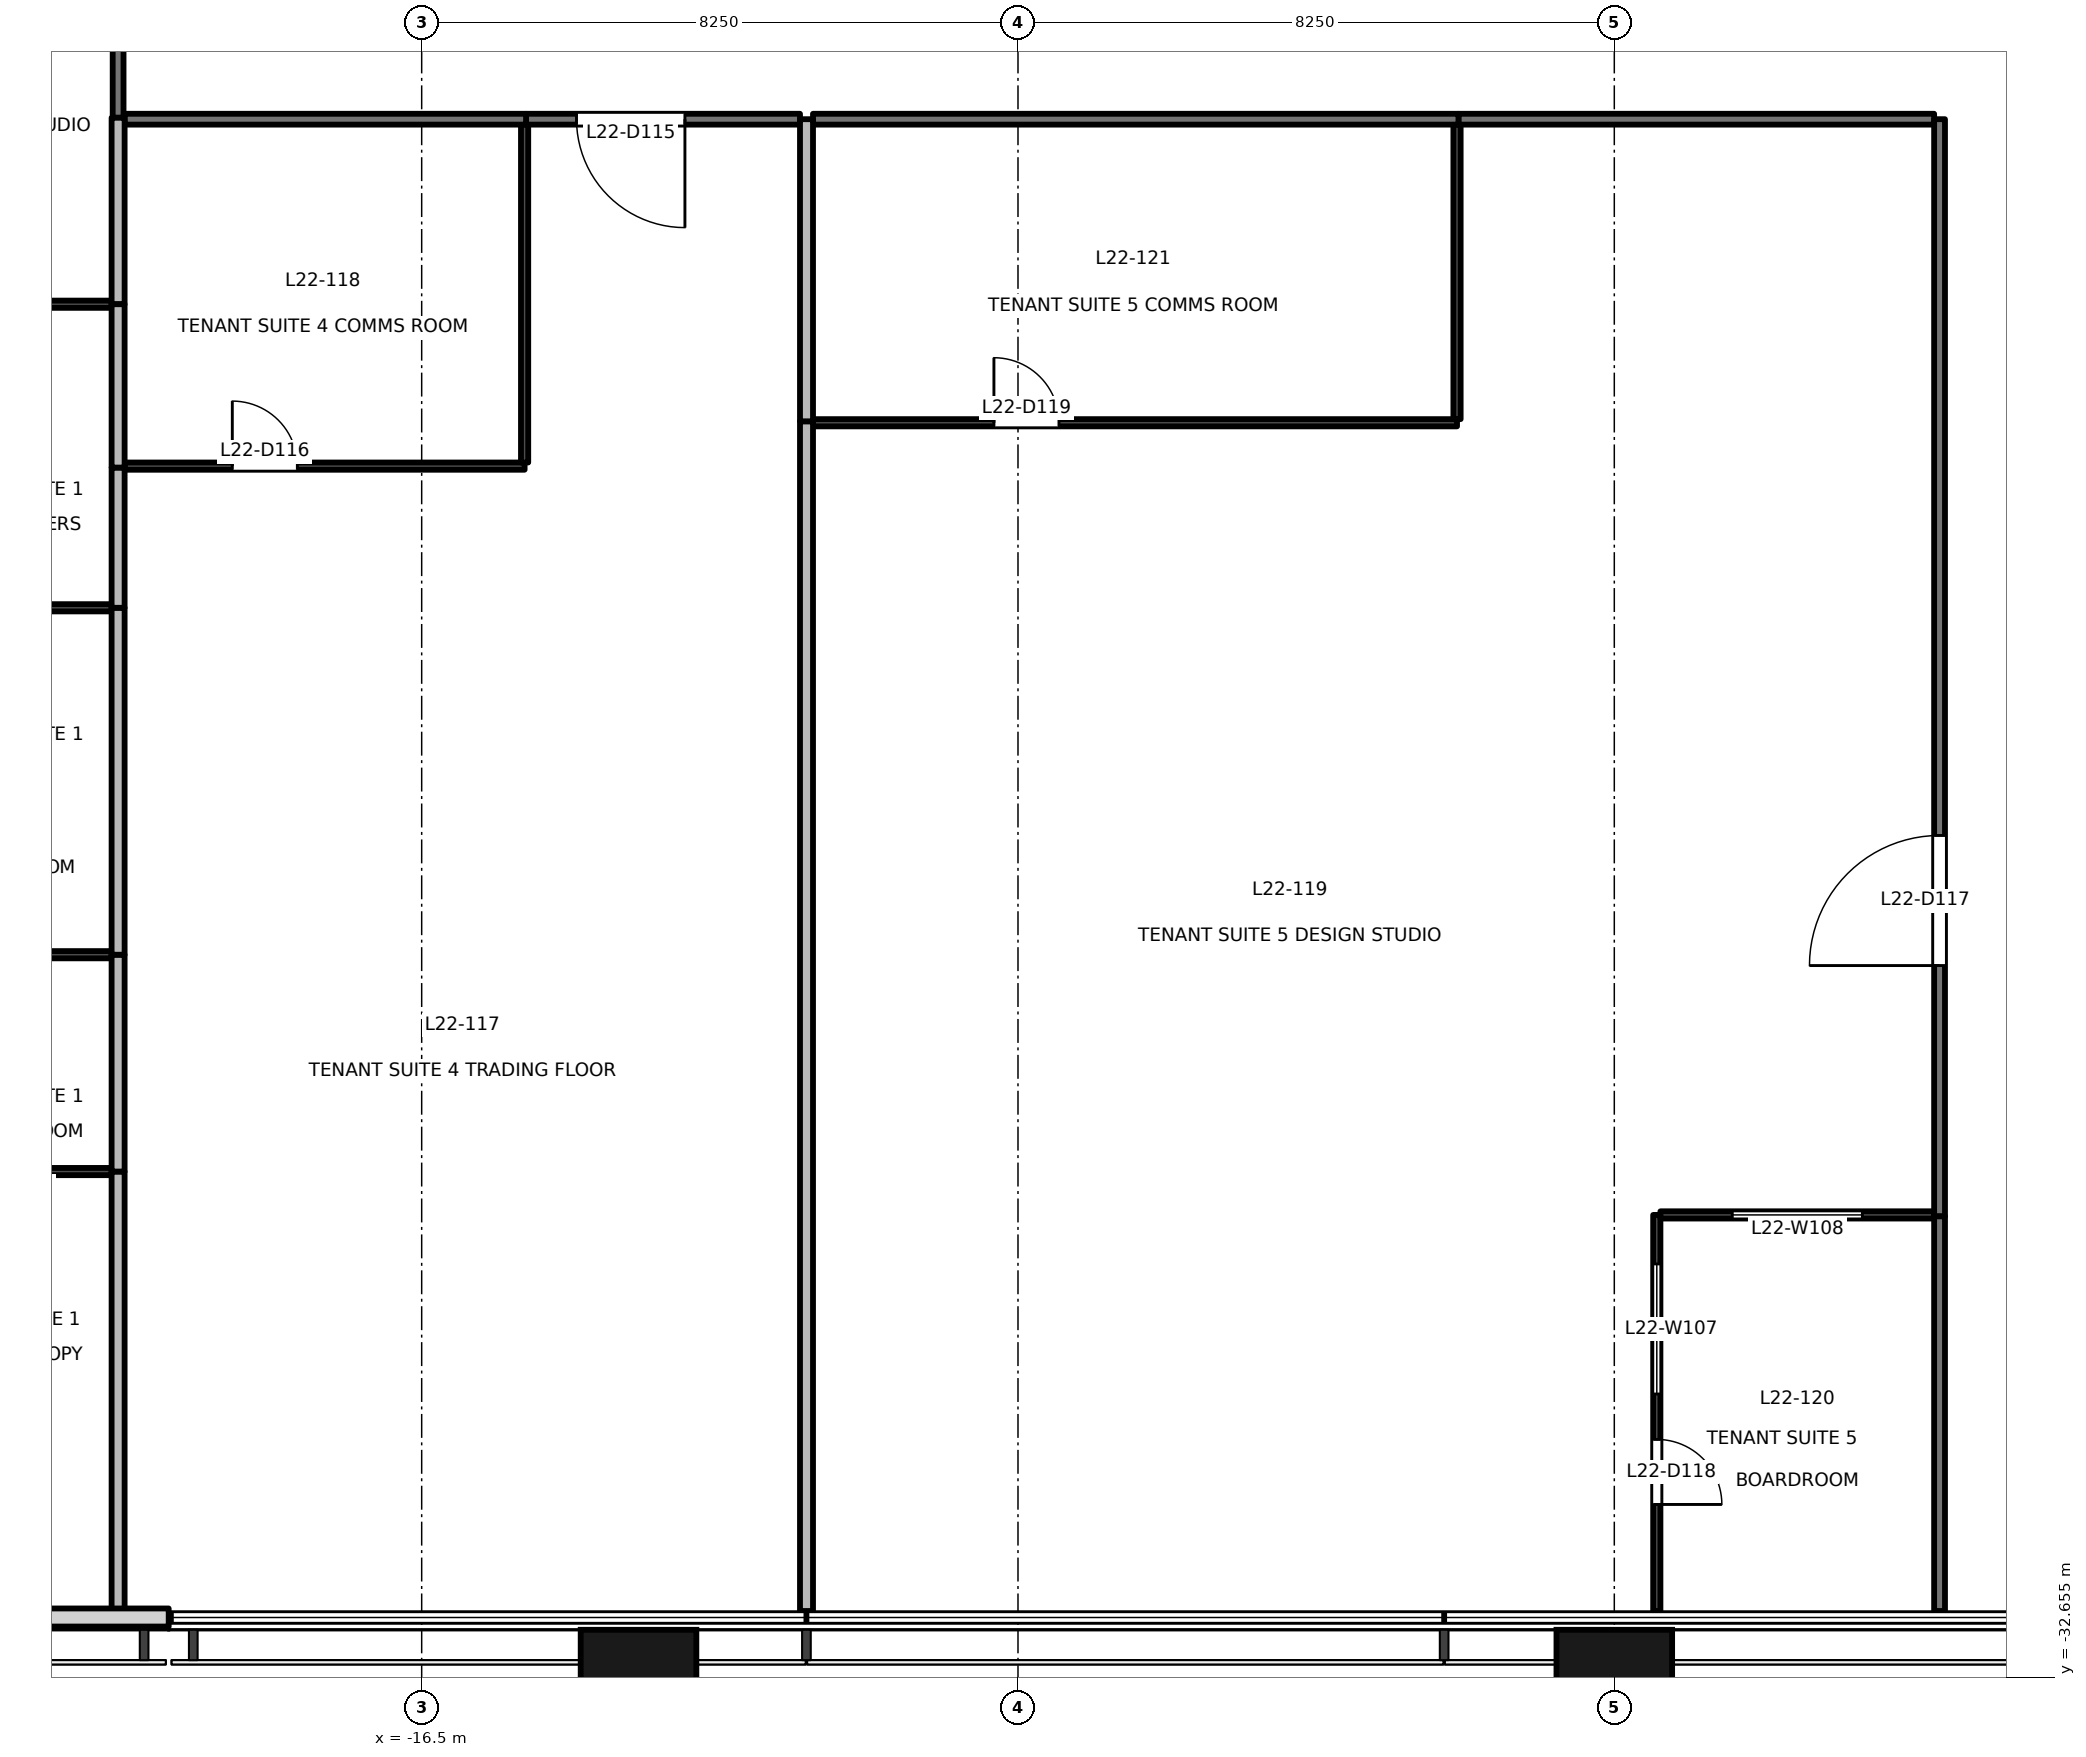
"""IFC4 building model, lengths in metres.
Left out: names, types, materials, properties, quantities, classifications, styles, units other than length and angle.
Written with IfcOpenShell. Run it as: python <this file> out.ifc"""

import sys

from ifc_helpers import new_model, si_unit, direction, frame, frame_2d, origin, origin_2d, place, context, subcontext, project, spatial, rectangle, extrude, element, fill, save


model = new_model("IFC4")
c1 = context("Model", 3, precision=1e-05, world=origin(), true_north=direction((0.0, 1.0)))
c2 = subcontext(c1, "Body", "Model", "MODEL_VIEW")
j1 = project(units=[si_unit("LENGTHUNIT", "METRE"), si_unit("PLANEANGLEUNIT", "RADIAN")], contexts=[c1])
p1 = place(None, origin())
s1 = spatial("IfcSite", under=j1, at=p1, CompositionType="ELEMENT")
p2 = place(p1, origin())
s2 = spatial("IfcBuilding", under=s1, at=p2, CompositionType="ELEMENT")
p3 = place(p2, frame((0.0, 0.0, 99.7)))
s3 = spatial("IfcBuildingStorey", under=s2, at=p3, CompositionType="ELEMENT", Elevation=99.7)
for number, where, z_axis, x_axis in (
    (1, (-13.5, -32.9, -0.2), (0.0, 0.0, 1.0), (1.0, 0.0, 0.0)),
    (2, (0.0, -32.9, -0.2), (0.0, 0.0, 1.0), (1.0, 0.0, 0.0)),
):
    element("IfcColumn", number, at=place(p3, frame(where, z_axis=z_axis, x_axis=x_axis)), inside=s3, PredefinedType="COLUMN", context=c2, shape_type="SweptSolid", body=[
        extrude(rectangle(XDim=1.6, YDim=1.8, at=origin_2d()), origin(), (0.0, 0.0, 1.0), 4.0),
    ])
p4 = place(p3, frame((-22.955, -31.83, 0.0), z_axis=(0.0, 0.0, 1.0), x_axis=(1.0, 0.0, 0.0)))
e3 = element("IfcWall", 3, at=p4, inside=s3, PredefinedType="SOLIDWALL", context=c2, shape_type="SweptSolid", body=[
    extrude(rectangle(XDim=2.955, YDim=0.25, at=frame_2d((1.478, 0.0))), origin(), (0.0, 0.0, 1.0), 3.8),
])
p5 = place(p3, frame((-20.7, -11.08, 0.0), z_axis=(0.0, 0.0, 1.0), x_axis=(0.0, 1.0, 0.0)))
e4 = element("IfcWall", 4, at=p5, inside=s3, PredefinedType="PARTITIONING", context=c2, shape_type="SweptSolid", body=[
    extrude(rectangle(XDim=3.4, YDim=0.15, at=frame_2d((1.7, 0.0))), origin(), (0.0, 0.0, 1.0), 3.8),
])
p6 = place(p3, frame((-11.266, -11.1, 0.0), z_axis=(0.0, 0.0, 1.0), x_axis=(-1.0, 0.0, 0.0)))
e5 = element("IfcWall", 5, at=p6, inside=s3, PredefinedType="PARTITIONING", context=c2, shape_type="SweptSolid", body=[
    extrude(rectangle(XDim=3.79, YDim=0.15, at=frame_2d((1.895, 0.0))), origin(), (0.0, 0.0, 1.0), 2.8),
])
p7 = place(p6, frame((1.592, 0.0, 0.0)))
e6 = element("IfcOpeningElement", 6, at=p7, cuts=e5, PredefinedType="OPENING", context=c2, shape_type="SweptSolid", body=[
    extrude(rectangle(XDim=1.5, YDim=2.1, at=frame_2d((0.75, 1.05))), frame((0.0, 0.085, 0.0), z_axis=(0.0, -1.0, 0.0), x_axis=(1.0, 0.0, 0.0)), (0.0, 0.0, 1.0), 0.171),
])
p8 = place(p3, frame((-15.056, -11.1, 0.0), z_axis=(0.0, 0.0, 1.0), x_axis=(-1.0, 0.0, 0.0)))
e7 = element("IfcWall", 7, at=p8, inside=s3, PredefinedType="PARTITIONING", context=c2, shape_type="SweptSolid", body=[
    extrude(rectangle(XDim=5.554, YDim=0.15, at=frame_2d((2.777, 0.0))), origin(), (0.0, 0.0, 1.0), 3.8),
])
p9 = place(p3, frame((4.425, -11.1, 0.0), z_axis=(0.0, 0.0, 1.0), x_axis=(-1.0, 0.0, 0.0)))
e8 = element("IfcWall", 8, at=p9, inside=s3, PredefinedType="PARTITIONING", context=c2, shape_type="SweptSolid", body=[
    extrude(rectangle(XDim=6.581, YDim=0.15, at=frame_2d((3.291, 0.0))), origin(), (0.0, 0.0, 1.0), 2.8),
])
p10 = place(p3, frame((4.5, -26.28, 0.0), z_axis=(0.0, 0.0, 1.0), x_axis=(0.0, 1.0, 0.0)))
e9 = element("IfcWall", 9, at=p10, inside=s3, PredefinedType="PARTITIONING", context=c2, shape_type="SweptSolid", body=[
    extrude(rectangle(XDim=15.18, YDim=0.15, at=frame_2d((7.59, 0.0))), origin(), (0.0, 0.0, 1.0), 2.8),
])
p11 = place(p10, frame((3.47, 0.0, 0.0)))
e10 = element("IfcOpeningElement", 10, at=p11, cuts=e9, PredefinedType="OPENING", context=c2, shape_type="SweptSolid", body=[
    extrude(rectangle(XDim=1.8, YDim=2.1, at=frame_2d((0.9, 1.05))), frame((0.0, 0.085, 0.0), z_axis=(0.0, -1.0, 0.0), x_axis=(1.0, 0.0, 0.0)), (0.0, 0.0, 1.0), 0.171),
])
p12 = place(p3, frame((4.5, -31.74, 0.0), z_axis=(0.0, 0.0, 1.0), x_axis=(0.0, 1.0, 0.0)))
e11 = element("IfcWall", 11, at=p12, inside=s3, PredefinedType="PARTITIONING", context=c2, shape_type="SweptSolid", body=[
    extrude(rectangle(XDim=5.46, YDim=0.15, at=frame_2d((2.73, 0.0))), origin(), (0.0, 0.0, 1.0), 2.8),
])
p13 = place(p3, frame((-2.156, -11.1, 0.0), z_axis=(0.0, 0.0, 1.0), x_axis=(-1.0, 0.0, 0.0)))
e12 = element("IfcWall", 12, at=p13, inside=s3, PredefinedType="PARTITIONING", context=c2, shape_type="SweptSolid", body=[
    extrude(rectangle(XDim=8.93, YDim=0.15, at=frame_2d((4.465, 0.0))), origin(), (0.0, 0.0, 1.0), 2.8),
])
p14 = place(p3, frame((-20.79, -13.66, 0.0), z_axis=(0.0, 0.0, 1.0), x_axis=(-1.0, 0.0, 0.0)))
e13 = element("IfcWall", 13, at=p14, inside=s3, PredefinedType="PARTITIONING", context=c2, shape_type="SweptSolid", body=[
    extrude(rectangle(XDim=2.86, YDim=0.1, at=frame_2d((1.43, 0.0))), origin(), (0.0, 0.0, 1.0), 3.8),
])
p15 = place(p3, frame((-20.7, -11.08, 0.0), z_axis=(0.0, 0.0, 1.0), x_axis=(0.0, -1.0, 0.0)))
e14 = element("IfcWall", 14, at=p15, inside=s3, PredefinedType="PARTITIONING", context=c2, shape_type="SweptSolid", body=[
    extrude(rectangle(XDim=2.58, YDim=0.18, at=frame_2d((1.29, 0.0))), origin(), (0.0, 0.0, 1.0), 3.8),
])
p16 = place(p3, frame((-20.79, -25.66, 0.0), z_axis=(0.0, 0.0, 1.0), x_axis=(-1.0, 0.0, 0.0)))
e15 = element("IfcWall", 15, at=p16, inside=s3, PredefinedType="PARTITIONING", context=c2, shape_type="SweptSolid", body=[
    extrude(rectangle(XDim=2.86, YDim=0.1, at=frame_2d((1.43, 0.0))), origin(), (0.0, 0.0, 1.0), 3.8),
])
p17 = place(p16, frame((1.03, 0.0, 0.0)))
e16 = element("IfcOpeningElement", 16, at=p17, cuts=e15, PredefinedType="OPENING", context=c2, shape_type="SweptSolid", body=[
    extrude(rectangle(XDim=0.8, YDim=2.1, at=frame_2d((0.4, 1.05))), frame((0.0, 0.061, 0.0), z_axis=(0.0, -1.0, 0.0), x_axis=(1.0, 0.0, 0.0)), (0.0, 0.0, 1.0), 0.121),
])
p18 = place(p3, frame((-20.7, -25.66, 0.0), z_axis=(0.0, 0.0, 1.0), x_axis=(0.0, -1.0, 0.0)))
e17 = element("IfcWall", 17, at=p18, inside=s3, PredefinedType="PARTITIONING", context=c2, shape_type="SweptSolid", body=[
    extrude(rectangle(XDim=6.08, YDim=0.18, at=frame_2d((3.04, 0.0))), origin(), (0.0, 0.0, 1.0), 3.8),
])
p19 = place(p3, frame((-23.65, -22.66, 0.0), z_axis=(0.0, 0.0, 1.0), x_axis=(1.0, 0.0, 0.0)))
e18 = element("IfcWall", 18, at=p19, inside=s3, PredefinedType="PARTITIONING", context=c2, shape_type="SweptSolid", body=[
    extrude(rectangle(XDim=2.86, YDim=0.1, at=frame_2d((1.43, 0.0))), origin(), (0.0, 0.0, 1.0), 3.8),
])
p20 = place(p3, frame((-20.7, -22.66, 0.0), z_axis=(0.0, 0.0, 1.0), x_axis=(0.0, -1.0, 0.0)))
e19 = element("IfcWall", 19, at=p20, inside=s3, PredefinedType="PARTITIONING", context=c2, shape_type="SweptSolid", body=[
    extrude(rectangle(XDim=3.0, YDim=0.18, at=frame_2d((1.5, 0.0))), origin(), (0.0, 0.0, 1.0), 3.8),
])
p21 = place(p3, frame((-23.65, -17.86, 0.0), z_axis=(0.0, 0.0, 1.0), x_axis=(1.0, 0.0, 0.0)))
e20 = element("IfcWall", 20, at=p21, inside=s3, PredefinedType="PARTITIONING", context=c2, shape_type="SweptSolid", body=[
    extrude(rectangle(XDim=2.86, YDim=0.1, at=frame_2d((1.43, 0.0))), origin(), (0.0, 0.0, 1.0), 3.8),
])
p22 = place(p3, frame((-20.7, -17.86, 0.0), z_axis=(0.0, 0.0, 1.0), x_axis=(0.0, -1.0, 0.0)))
e21 = element("IfcWall", 21, at=p22, inside=s3, PredefinedType="PARTITIONING", context=c2, shape_type="SweptSolid", body=[
    extrude(rectangle(XDim=4.8, YDim=0.18, at=frame_2d((2.4, 0.0))), origin(), (0.0, 0.0, 1.0), 3.8),
])
p23 = place(p3, frame((-20.7, -15.92, 0.0), z_axis=(0.0, 0.0, 1.0), x_axis=(0.0, -1.0, 0.0)))
e22 = element("IfcWall", 22, at=p23, inside=s3, PredefinedType="PARTITIONING", context=c2, shape_type="SweptSolid", body=[
    extrude(rectangle(XDim=1.94, YDim=0.18, at=frame_2d((0.97, 0.0))), origin(), (0.0, 0.0, 1.0), 3.8),
])
p24 = place(p3, frame((-20.7, -13.66, 0.0), z_axis=(0.0, 0.0, 1.0), x_axis=(0.0, -1.0, 0.0)))
e23 = element("IfcWall", 23, at=p24, inside=s3, PredefinedType="PARTITIONING", context=c2, shape_type="SweptSolid", body=[
    extrude(rectangle(XDim=2.26, YDim=0.18, at=frame_2d((1.13, 0.0))), origin(), (0.0, 0.0, 1.0), 3.8),
])
p25 = place(p3, frame((-20.61, -15.9, 0.0), z_axis=(0.0, 0.0, 1.0), x_axis=(1.0, 0.0, 0.0)))
e24 = element("IfcWall", 24, at=p25, inside=s3, PredefinedType="PARTITIONING", context=c2, shape_type="SweptSolid", body=[
    extrude(rectangle(XDim=5.534, YDim=0.1, at=frame_2d((2.767, 0.0))), origin(), (0.0, 0.0, 1.0), 3.8),
])
p26 = place(p25, frame((1.49, 0.0, 0.0)))
e25 = element("IfcOpeningElement", 25, at=p26, cuts=e24, PredefinedType="OPENING", context=c2, shape_type="SweptSolid", body=[
    extrude(rectangle(XDim=0.9, YDim=2.1, at=frame_2d((0.45, 1.05))), frame((0.0, 0.061, 0.0), z_axis=(0.0, -1.0, 0.0), x_axis=(1.0, 0.0, 0.0)), (0.0, 0.0, 1.0), 0.121),
])
p27 = place(p3, frame((-15.076, -15.85, 0.0), z_axis=(0.0, 0.0, 1.0), x_axis=(0.0, 1.0, 0.0)))
e26 = element("IfcWall", 26, at=p27, inside=s3, PredefinedType="PARTITIONING", context=c2, shape_type="SweptSolid", body=[
    extrude(rectangle(XDim=4.675, YDim=0.1, at=frame_2d((2.337, 0.0))), origin(), (0.0, 0.0, 1.0), 3.8),
])
p28 = place(p3, frame((-11.176, -15.28, 0.0), z_axis=(0.0, 0.0, 1.0), x_axis=(0.0, -1.0, 0.0)))
e27 = element("IfcWall", 27, at=p28, inside=s3, PredefinedType="PARTITIONING", context=c2, shape_type="SweptSolid", body=[
    extrude(rectangle(XDim=16.46, YDim=0.18, at=frame_2d((8.23, 0.0))), origin(), (0.0, 0.0, 1.0), 3.8),
])
p29 = place(p3, frame((-11.176, -11.1, 0.0), z_axis=(0.0, 0.0, 1.0), x_axis=(0.0, -1.0, 0.0)))
e28 = element("IfcWall", 28, at=p29, inside=s3, PredefinedType="PARTITIONING", context=c2, shape_type="SweptSolid", body=[
    extrude(rectangle(XDim=4.18, YDim=0.18, at=frame_2d((2.09, 0.0))), origin(), (0.0, 0.0, 1.0), 3.8),
])
p30 = place(p3, frame((0.588, -26.26, 0.0), z_axis=(0.0, 0.0, 1.0), x_axis=(0.0, -1.0, 0.0)))
e29 = element("IfcWall", 29, at=p30, inside=s3, PredefinedType="PARTITIONING", context=c2, shape_type="SweptSolid", body=[
    extrude(rectangle(XDim=5.48, YDim=0.1, at=frame_2d((2.74, 0.0))), origin(), (0.0, 0.0, 1.0), 3.8),
])
p31 = place(p30, frame((3.106, 0.0, 0.0)))
e30 = element("IfcOpeningElement", 30, at=p31, cuts=e29, PredefinedType="OPENING", context=c2, shape_type="SweptSolid", body=[
    extrude(rectangle(XDim=0.9, YDim=2.1, at=frame_2d((0.45, 1.05))), frame((0.0, 0.061, 0.0), z_axis=(0.0, -1.0, 0.0), x_axis=(1.0, 0.0, 0.0)), (0.0, 0.0, 1.0), 0.121),
])
p32 = place(p30, frame((0.678, 0.0, 0.9)))
e31 = element("IfcOpeningElement", 31, at=p32, cuts=e29, PredefinedType="OPENING", context=c2, shape_type="SweptSolid", body=[
    extrude(rectangle(XDim=1.8, YDim=1.2, at=frame_2d((0.9, 0.6))), frame((0.0, 0.061, 0.0), z_axis=(0.0, -1.0, 0.0), x_axis=(1.0, 0.0, 0.0)), (0.0, 0.0, 1.0), 0.121),
])
p33 = place(p3, frame((4.425, -26.26, 0.0), z_axis=(0.0, 0.0, 1.0), x_axis=(-1.0, 0.0, 0.0)))
e32 = element("IfcWall", 32, at=p33, inside=s3, PredefinedType="PARTITIONING", context=c2, shape_type="SweptSolid", body=[
    extrude(rectangle(XDim=3.787, YDim=0.1, at=frame_2d((1.894, 0.0))), origin(), (0.0, 0.0, 1.0), 2.8),
])
p34 = place(p33, frame((0.993, 0.0, 0.9)))
e33 = element("IfcOpeningElement", 33, at=p34, cuts=e32, PredefinedType="OPENING", context=c2, shape_type="SweptSolid", body=[
    extrude(rectangle(XDim=1.8, YDim=1.2, at=frame_2d((0.9, 0.6))), frame((0.0, 0.061, 0.0), z_axis=(0.0, -1.0, 0.0), x_axis=(1.0, 0.0, 0.0)), (0.0, 0.0, 1.0), 0.121),
])
p35 = place(p3, frame((-11.086, -15.3, 0.0), z_axis=(0.0, 0.0, 1.0), x_axis=(1.0, 0.0, 0.0)))
e34 = element("IfcWall", 34, at=p35, inside=s3, PredefinedType="PARTITIONING", context=c2, shape_type="SweptSolid", body=[
    extrude(rectangle(XDim=8.91, YDim=0.1, at=frame_2d((4.455, 0.0))), origin(), (0.0, 0.0, 1.0), 2.8),
])
p36 = place(p35, frame((2.503, 0.0, 0.0)))
e35 = element("IfcOpeningElement", 35, at=p36, cuts=e34, PredefinedType="OPENING", context=c2, shape_type="SweptSolid", body=[
    extrude(rectangle(XDim=0.9, YDim=2.1, at=frame_2d((0.45, 1.05))), frame((0.0, 0.061, 0.0), z_axis=(0.0, -1.0, 0.0), x_axis=(1.0, 0.0, 0.0)), (0.0, 0.0, 1.0), 0.121),
])
p37 = place(p3, frame((-2.176, -15.25, 0.0), z_axis=(0.0, 0.0, 1.0), x_axis=(0.0, 1.0, 0.0)))
e36 = element("IfcWall", 36, at=p37, inside=s3, PredefinedType="PARTITIONING", context=c2, shape_type="SweptSolid", body=[
    extrude(rectangle(XDim=4.075, YDim=0.1, at=frame_2d((2.038, 0.0))), origin(), (0.0, 0.0, 1.0), 3.8),
])
p38 = place(p7, origin())
e37 = element("IfcDoor", 37, at=p38, inside=s3, OperationType="DOUBLE_DOOR_SINGLE_SWING", PredefinedType="DOOR", context=c2, shape_type="SweptSolid", body=[
    extrude(rectangle(XDim=1.5, YDim=2.1, at=frame_2d((0.75, 1.05))), frame((0.0, 0.025, 0.0), z_axis=(0.0, -1.0, 0.0), x_axis=(1.0, 0.0, 0.0)), (0.0, 0.0, 1.0), 0.05),
])
fill(e6, e37)
p39 = place(p26, origin())
e38 = element("IfcDoor", 38, at=p39, inside=s3, OperationType="SINGLE_SWING_LEFT", PredefinedType="DOOR", context=c2, shape_type="SweptSolid", body=[
    extrude(rectangle(XDim=0.9, YDim=2.1, at=frame_2d((0.45, 1.05))), frame((0.0, 0.025, 0.0), z_axis=(0.0, -1.0, 0.0), x_axis=(1.0, 0.0, 0.0)), (0.0, 0.0, 1.0), 0.05),
])
fill(e25, e38)
p40 = place(p11, origin())
e39 = element("IfcDoor", 39, at=p40, inside=s3, OperationType="DOUBLE_DOOR_SINGLE_SWING", PredefinedType="DOOR", context=c2, shape_type="SweptSolid", body=[
    extrude(rectangle(XDim=1.8, YDim=2.1, at=frame_2d((0.9, 1.05))), frame((0.0, 0.025, 0.0), z_axis=(0.0, -1.0, 0.0), x_axis=(1.0, 0.0, 0.0)), (0.0, 0.0, 1.0), 0.05),
])
fill(e10, e39)
p41 = place(p31, origin())
e40 = element("IfcDoor", 40, at=p41, inside=s3, OperationType="SINGLE_SWING_RIGHT", PredefinedType="DOOR", context=c2, shape_type="SweptSolid", body=[
    extrude(rectangle(XDim=0.9, YDim=2.1, at=frame_2d((0.45, 1.05))), frame((0.0, 0.025, 0.0), z_axis=(0.0, -1.0, 0.0), x_axis=(1.0, 0.0, 0.0)), (0.0, 0.0, 1.0), 0.05),
])
fill(e30, e40)
p42 = place(p36, origin())
e41 = element("IfcDoor", 41, at=p42, inside=s3, OperationType="SINGLE_SWING_LEFT", PredefinedType="DOOR", context=c2, shape_type="SweptSolid", body=[
    extrude(rectangle(XDim=0.9, YDim=2.1, at=frame_2d((0.45, 1.05))), frame((0.0, 0.025, 0.0), z_axis=(0.0, -1.0, 0.0), x_axis=(1.0, 0.0, 0.0)), (0.0, 0.0, 1.0), 0.05),
])
fill(e35, e41)
p43 = place(p32, origin())
e42 = element("IfcWindow", 42, at=p43, inside=s3, PartitioningType="SINGLE_PANEL", PredefinedType="WINDOW", context=c2, shape_type="SweptSolid", body=[
    extrude(rectangle(XDim=1.8, YDim=1.2, at=frame_2d((0.9, 0.6))), frame((0.0, 0.03, 0.0), z_axis=(0.0, -1.0, 0.0), x_axis=(1.0, 0.0, 0.0)), (0.0, 0.0, 1.0), 0.06),
])
fill(e31, e42)
p44 = place(p34, origin())
e43 = element("IfcWindow", 43, at=p44, inside=s3, PartitioningType="SINGLE_PANEL", PredefinedType="WINDOW", context=c2, shape_type="SweptSolid", body=[
    extrude(rectangle(XDim=1.8, YDim=1.2, at=frame_2d((0.9, 0.6))), frame((0.0, 0.03, 0.0), z_axis=(0.0, -1.0, 0.0), x_axis=(1.0, 0.0, 0.0)), (0.0, 0.0, 1.0), 0.06),
])
fill(e33, e43)
save(model, sys.argv[1])
